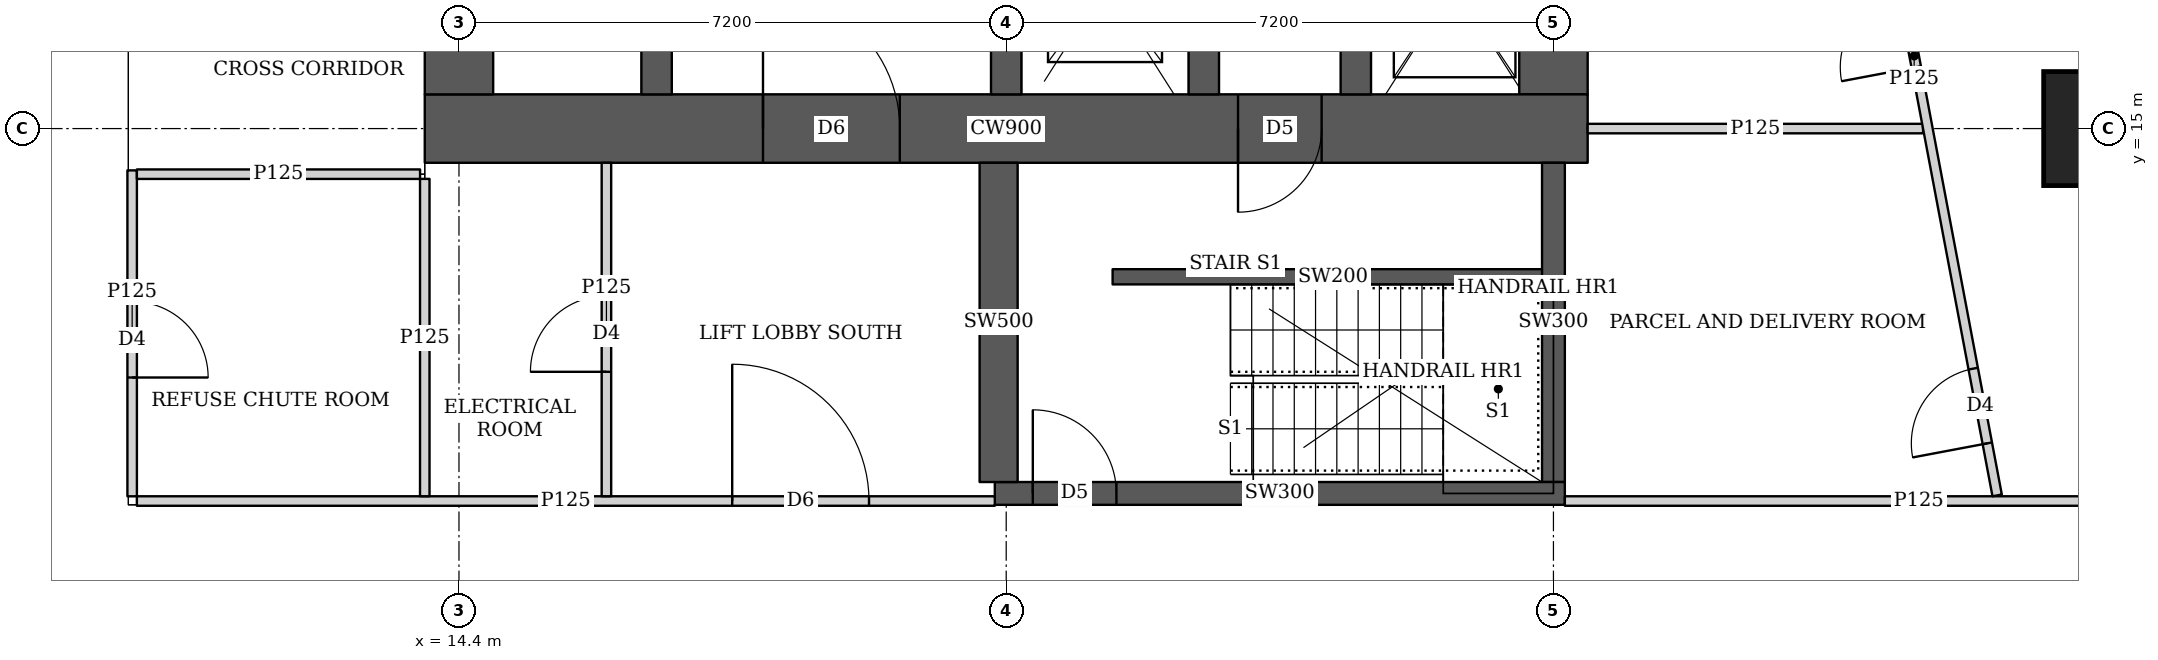
"""IFC4 building model, lengths in metres.
Left out: names, types, materials, properties, quantities, classifications, styles, units other than length and angle.
Written with IfcOpenShell. Run it as: python <this file> out.ifc"""

import sys

from ifc_helpers import new_model, si_unit, direction, frame, frame_2d, origin, origin_2d, place, context, subcontext, project, spatial, rectangle, extrude, element, fill, save


model = new_model("IFC4")
c1 = context("Model", 3, precision=1e-05, world=origin(), true_north=direction((0.0, 1.0)))
c2 = subcontext(c1, "Body", "Model", "MODEL_VIEW")
j1 = project(units=[si_unit("LENGTHUNIT", "METRE"), si_unit("PLANEANGLEUNIT", "RADIAN")], contexts=[c1])
p1 = place(None, origin())
s1 = spatial("IfcSite", under=j1, at=p1, CompositionType="ELEMENT")
p2 = place(p1, origin())
s2 = spatial("IfcBuilding", under=s1, at=p2, CompositionType="ELEMENT")
p3 = place(p2, frame((0.0, 0.0, 169.55)))
s3 = spatial("IfcBuildingStorey", under=s2, at=p3, CompositionType="ELEMENT", Elevation=169.55)
p4 = place(p3, frame((36.0, 15.0, 0.0), z_axis=(0.0, 0.0, 1.0), x_axis=(1.0, 0.0, 0.0)))
e1 = element("IfcColumn", 1, at=p4, inside=s3, PredefinedType="COLUMN", context=c2, shape_type="SweptSolid", body=[
    extrude(rectangle(XDim=1.5, YDim=1.5, at=origin_2d()), origin(), (0.0, 0.0, 1.0), 3.75),
])
p5 = place(p3, frame((13.95, 15.0, 0.0), z_axis=(0.0, 0.0, 1.0), x_axis=(1.0, 0.0, 0.0)))
e2 = element("IfcWall", 2, at=p5, inside=s3, PredefinedType="SHEAR", context=c2, shape_type="SweptSolid", body=[
    extrude(rectangle(XDim=15.3, YDim=0.9, at=frame_2d((7.65, 0.0))), origin(), (0.0, 0.0, 1.0), 3.75),
])
p6 = place(p5, frame((4.45, 0.0, 0.0)))
e3 = element("IfcOpeningElement", 3, at=p6, cuts=e2, PredefinedType="OPENING", context=c2, shape_type="SweptSolid", body=[
    extrude(rectangle(XDim=1.8, YDim=2.1, at=frame_2d((0.9, 1.05))), frame((0.0, 0.46, 0.0), z_axis=(0.0, -1.0, 0.0), x_axis=(1.0, 0.0, 0.0)), (0.0, 0.0, 1.0), 0.92),
])
p7 = place(p5, frame((10.7, 0.0, 0.0)))
e4 = element("IfcOpeningElement", 4, at=p7, cuts=e2, PredefinedType="OPENING", context=c2, shape_type="SweptSolid", body=[
    extrude(rectangle(XDim=1.1, YDim=2.1, at=frame_2d((0.55, 1.05))), frame((0.0, 0.46, 0.0), z_axis=(0.0, -1.0, 0.0), x_axis=(1.0, 0.0, 0.0)), (0.0, 0.0, 1.0), 0.92),
])
for number, where, z_axis, x_axis in (
    (5, (14.4, 15.45, 0.0), (0.0, 0.0, 1.0), (0.0, 1.0, 0.0)),
    (6, (28.8, 15.45, 0.0), (0.0, 0.0, 1.0), (0.0, 1.0, 0.0)),
):
    element("IfcWall", number, at=place(p3, frame(where, z_axis=z_axis, x_axis=x_axis)), inside=s3, PredefinedType="SHEAR", context=c2, shape_type="SweptSolid", body=[
        extrude(rectangle(XDim=14.1, YDim=0.9, at=frame_2d((7.05, 0.0))), origin(), (0.0, 0.0, 1.0), 3.75),
    ])
p8 = place(p3, frame((17.0, 15.45, 0.0), z_axis=(0.0, 0.0, 1.0), x_axis=(0.0, 1.0, 0.0)))
e7 = element("IfcWall", 7, at=p8, inside=s3, PredefinedType="SHEAR", context=c2, shape_type="SweptSolid", body=[
    extrude(rectangle(XDim=14.1, YDim=0.4, at=frame_2d((7.05, 0.0))), origin(), (0.0, 0.0, 1.0), 3.75),
])
p9 = place(p8, frame((0.925, 0.0, 0.0)))
e8 = element("IfcOpeningElement", 8, at=p9, cuts=e7, PredefinedType="OPENING", context=c2, shape_type="SweptSolid", body=[
    extrude(rectangle(XDim=1.0, YDim=2.1, at=frame_2d((0.5, 1.05))), frame((0.0, 0.21, 0.0), z_axis=(0.0, -1.0, 0.0), x_axis=(1.0, 0.0, 0.0)), (0.0, 0.0, 1.0), 0.42),
])
p10 = place(p8, frame((4.675, 0.0, 0.0)))
e9 = element("IfcOpeningElement", 9, at=p10, cuts=e7, PredefinedType="OPENING", context=c2, shape_type="SweptSolid", body=[
    extrude(rectangle(XDim=1.0, YDim=2.1, at=frame_2d((0.5, 1.05))), frame((0.0, 0.21, 0.0), z_axis=(0.0, -1.0, 0.0), x_axis=(1.0, 0.0, 0.0)), (0.0, 0.0, 1.0), 0.42),
])
p11 = place(p8, frame((8.425, 0.0, 0.0)))
e10 = element("IfcOpeningElement", 10, at=p11, cuts=e7, PredefinedType="OPENING", context=c2, shape_type="SweptSolid", body=[
    extrude(rectangle(XDim=1.0, YDim=2.1, at=frame_2d((0.5, 1.05))), frame((0.0, 0.21, 0.0), z_axis=(0.0, -1.0, 0.0), x_axis=(1.0, 0.0, 0.0)), (0.0, 0.0, 1.0), 0.42),
])
p12 = place(p8, frame((12.175, 0.0, 0.0)))
e11 = element("IfcOpeningElement", 11, at=p12, cuts=e7, PredefinedType="OPENING", context=c2, shape_type="SweptSolid", body=[
    extrude(rectangle(XDim=1.0, YDim=2.1, at=frame_2d((0.5, 1.05))), frame((0.0, 0.21, 0.0), z_axis=(0.0, -1.0, 0.0), x_axis=(1.0, 0.0, 0.0)), (0.0, 0.0, 1.0), 0.42),
])
p13 = place(p3, frame((21.6, 15.45, 0.0), z_axis=(0.0, 0.0, 1.0), x_axis=(0.0, 1.0, 0.0)))
e12 = element("IfcWall", 12, at=p13, inside=s3, PredefinedType="SHEAR", context=c2, shape_type="SweptSolid", body=[
    extrude(rectangle(XDim=14.1, YDim=0.4, at=frame_2d((7.05, 0.0))), origin(), (0.0, 0.0, 1.0), 3.75),
])
p14 = place(p13, frame((0.875, 0.0, 0.0)))
e13 = element("IfcOpeningElement", 13, at=p14, cuts=e12, PredefinedType="OPENING", context=c2, shape_type="SweptSolid", body=[
    extrude(rectangle(XDim=1.1, YDim=2.1, at=frame_2d((0.55, 1.05))), frame((0.0, 0.21, 0.0), z_axis=(0.0, -1.0, 0.0), x_axis=(1.0, 0.0, 0.0)), (0.0, 0.0, 1.0), 0.42),
])
p15 = place(p13, frame((4.625, 0.0, 0.0)))
e14 = element("IfcOpeningElement", 14, at=p15, cuts=e12, PredefinedType="OPENING", context=c2, shape_type="SweptSolid", body=[
    extrude(rectangle(XDim=1.1, YDim=2.1, at=frame_2d((0.55, 1.05))), frame((0.0, 0.21, 0.0), z_axis=(0.0, -1.0, 0.0), x_axis=(1.0, 0.0, 0.0)), (0.0, 0.0, 1.0), 0.42),
])
p16 = place(p13, frame((8.375, 0.0, 0.0)))
e15 = element("IfcOpeningElement", 15, at=p16, cuts=e12, PredefinedType="OPENING", context=c2, shape_type="SweptSolid", body=[
    extrude(rectangle(XDim=1.1, YDim=2.1, at=frame_2d((0.55, 1.05))), frame((0.0, 0.21, 0.0), z_axis=(0.0, -1.0, 0.0), x_axis=(1.0, 0.0, 0.0)), (0.0, 0.0, 1.0), 0.42),
])
p17 = place(p13, frame((12.125, 0.0, 0.0)))
e16 = element("IfcOpeningElement", 16, at=p17, cuts=e12, PredefinedType="OPENING", context=c2, shape_type="SweptSolid", body=[
    extrude(rectangle(XDim=1.1, YDim=2.1, at=frame_2d((0.55, 1.05))), frame((0.0, 0.21, 0.0), z_axis=(0.0, -1.0, 0.0), x_axis=(1.0, 0.0, 0.0)), (0.0, 0.0, 1.0), 0.42),
])
p18 = place(p3, frame((24.2, 15.45, 0.0), z_axis=(0.0, 0.0, 1.0), x_axis=(0.0, 1.0, 0.0)))
e17 = element("IfcWall", 17, at=p18, inside=s3, PredefinedType="SHEAR", context=c2, shape_type="SweptSolid", body=[
    extrude(rectangle(XDim=14.1, YDim=0.4, at=frame_2d((7.05, 0.0))), origin(), (0.0, 0.0, 1.0), 3.75),
])
p19 = place(p3, frame((26.2, 15.45, 0.0), z_axis=(0.0, 0.0, 1.0), x_axis=(0.0, 1.0, 0.0)))
e18 = element("IfcWall", 18, at=p19, inside=s3, PredefinedType="SHEAR", context=c2, shape_type="SweptSolid", body=[
    extrude(rectangle(XDim=3.1, YDim=0.4, at=frame_2d((1.55, 0.0))), origin(), (0.0, 0.0, 1.0), 3.75),
])
p20 = place(p19, frame((0.825, 0.0, 0.0)))
e19 = element("IfcOpeningElement", 19, at=p20, cuts=e18, PredefinedType="OPENING", context=c2, shape_type="SweptSolid", body=[
    extrude(rectangle(XDim=1.2, YDim=2.1, at=frame_2d((0.6, 1.05))), frame((0.0, 0.21, 0.0), z_axis=(0.0, -1.0, 0.0), x_axis=(1.0, 0.0, 0.0)), (0.0, 0.0, 1.0), 0.42),
])
p21 = place(p3, frame((21.45, 10.2, 0.0), z_axis=(0.0, 0.0, 1.0), x_axis=(1.0, 0.0, 0.0)))
e20 = element("IfcWall", 20, at=p21, inside=s3, PredefinedType="SHEAR", context=c2, shape_type="SweptSolid", body=[
    extrude(rectangle(XDim=7.5, YDim=0.3, at=frame_2d((3.75, 0.0))), origin(), (0.0, 0.0, 1.0), 3.75),
])
p22 = place(p21, frame((0.5, 0.0, 0.0)))
e21 = element("IfcOpeningElement", 21, at=p22, cuts=e20, PredefinedType="OPENING", context=c2, shape_type="SweptSolid", body=[
    extrude(rectangle(XDim=1.1, YDim=2.1, at=frame_2d((0.55, 1.05))), frame((0.0, 0.16, 0.0), z_axis=(0.0, -1.0, 0.0), x_axis=(1.0, 0.0, 0.0)), (0.0, 0.0, 1.0), 0.32),
])
p23 = place(p3, frame((21.5, 10.35, 0.0), z_axis=(0.0, 0.0, 1.0), x_axis=(0.0, 1.0, 0.0)))
e22 = element("IfcWall", 22, at=p23, inside=s3, PredefinedType="SHEAR", context=c2, shape_type="SweptSolid", body=[
    extrude(rectangle(XDim=4.2, YDim=0.5, at=frame_2d((2.1, 0.0))), origin(), (0.0, 0.0, 1.0), 3.75),
])
p24 = place(p3, frame((28.8, 10.35, 0.0), z_axis=(0.0, 0.0, 1.0), x_axis=(0.0, 1.0, 0.0)))
e23 = element("IfcWall", 23, at=p24, inside=s3, PredefinedType="SHEAR", context=c2, shape_type="SweptSolid", body=[
    extrude(rectangle(XDim=4.2, YDim=0.3, at=frame_2d((2.1, 0.0))), origin(), (0.0, 0.0, 1.0), 3.75),
])
p25 = place(p3, frame((33.877, 43.029, 0.0), z_axis=(0.0, 0.0, 1.0), x_axis=(0.185596841028, -0.98262597798, 0.0)))
e24 = element("IfcWall", 24, at=p25, inside=s3, PredefinedType="SOLIDWALL", context=c2, shape_type="SweptSolid", body=[
    extrude(rectangle(XDim=41.66, YDim=0.15, at=frame_2d((20.83, 0.0))), origin(), (0.0, 0.0, 1.0), 2.5),
])
p26 = place(p25, frame((8.63, 0.0, 0.0)))
e25 = element("IfcOpeningElement", 25, at=p26, cuts=e24, PredefinedType="OPENING", context=c2, shape_type="SweptSolid", body=[
    extrude(rectangle(XDim=1.0, YDim=2.1, at=frame_2d((0.5, 1.05))), frame((0.0, 0.085, 0.0), z_axis=(0.0, -1.0, 0.0), x_axis=(1.0, 0.0, 0.0)), (0.0, 0.0, 1.0), 0.17),
])
p27 = place(p25, frame((13.841, 0.0, 0.0)))
e26 = element("IfcOpeningElement", 26, at=p27, cuts=e24, PredefinedType="OPENING", context=c2, shape_type="SweptSolid", body=[
    extrude(rectangle(XDim=1.0, YDim=2.1, at=frame_2d((0.5, 1.05))), frame((0.0, 0.085, 0.0), z_axis=(0.0, -1.0, 0.0), x_axis=(1.0, 0.0, 0.0)), (0.0, 0.0, 1.0), 0.17),
])
p28 = place(p25, frame((21.474, 0.0, 0.0)))
e27 = element("IfcOpeningElement", 27, at=p28, cuts=e24, PredefinedType="OPENING", context=c2, shape_type="SweptSolid", body=[
    extrude(rectangle(XDim=1.0, YDim=2.1, at=frame_2d((0.5, 1.05))), frame((0.0, 0.085, 0.0), z_axis=(0.0, -1.0, 0.0), x_axis=(1.0, 0.0, 0.0)), (0.0, 0.0, 1.0), 0.17),
])
p29 = place(p25, frame((30.4, 0.0, 0.0)))
e28 = element("IfcOpeningElement", 28, at=p29, cuts=e24, PredefinedType="OPENING", context=c2, shape_type="SweptSolid", body=[
    extrude(rectangle(XDim=1.0, YDim=2.1, at=frame_2d((0.5, 1.05))), frame((0.0, 0.085, 0.0), z_axis=(0.0, -1.0, 0.0), x_axis=(1.0, 0.0, 0.0)), (0.0, 0.0, 1.0), 0.17),
])
p30 = place(p25, frame((32.288, 0.0, 0.0)))
e29 = element("IfcOpeningElement", 29, at=p30, cuts=e24, PredefinedType="OPENING", context=c2, shape_type="SweptSolid", body=[
    extrude(rectangle(XDim=1.0, YDim=2.1, at=frame_2d((0.5, 1.05))), frame((0.0, 0.085, 0.0), z_axis=(0.0, -1.0, 0.0), x_axis=(1.0, 0.0, 0.0)), (0.0, 0.0, 1.0), 0.17),
])
p31 = place(p3, frame((10.1, 10.162, 0.0), z_axis=(0.0, 0.0, 1.0), x_axis=(0.0, 1.0, 0.0)))
e30 = element("IfcWall", 30, at=p31, inside=s3, PredefinedType="PARTITIONING", context=c2, shape_type="SweptSolid", body=[
    extrude(rectangle(XDim=4.288, YDim=0.125, at=frame_2d((2.144, 0.0))), origin(), (0.0, 0.0, 1.0), 3.5),
])
p32 = place(p31, frame((1.563, 0.0, 0.0)))
e31 = element("IfcOpeningElement", 31, at=p32, cuts=e30, PredefinedType="OPENING", context=c2, shape_type="SweptSolid", body=[
    extrude(rectangle(XDim=1.0, YDim=2.1, at=frame_2d((0.5, 1.05))), frame((0.0, 0.073, 0.0), z_axis=(0.0, -1.0, 0.0), x_axis=(1.0, 0.0, 0.0)), (0.0, 0.0, 1.0), 0.145),
])
p33 = place(p3, frame((10.162, 14.4, 0.0), z_axis=(0.0, 0.0, 1.0), x_axis=(1.0, 0.0, 0.0)))
e32 = element("IfcWall", 32, at=p33, inside=s3, PredefinedType="PARTITIONING", context=c2, shape_type="SweptSolid", body=[
    extrude(rectangle(XDim=3.726, YDim=0.125, at=frame_2d((1.863, 0.0))), origin(), (0.0, 0.0, 1.0), 3.5),
])
p34 = place(p3, frame((13.95, 10.163, 0.0), z_axis=(0.0, 0.0, 1.0), x_axis=(0.0, 1.0, 0.0)))
e33 = element("IfcWall", 33, at=p34, inside=s3, PredefinedType="PARTITIONING", context=c2, shape_type="SweptSolid", body=[
    extrude(rectangle(XDim=4.175, YDim=0.125, at=frame_2d((2.087, 0.0))), origin(), (0.0, 0.0, 1.0), 3.5),
])
p35 = place(p3, frame((10.162, 10.1, 0.0), z_axis=(0.0, 0.0, 1.0), x_axis=(1.0, 0.0, 0.0)))
e34 = element("IfcWall", 34, at=p35, inside=s3, PredefinedType="PARTITIONING", context=c2, shape_type="SweptSolid", body=[
    extrude(rectangle(XDim=11.288, YDim=0.125, at=frame_2d((5.644, 0.0))), origin(), (0.0, 0.0, 1.0), 3.5),
])
p36 = place(p35, frame((7.833, 0.0, 0.0)))
e35 = element("IfcOpeningElement", 35, at=p36, cuts=e34, PredefinedType="OPENING", context=c2, shape_type="SweptSolid", body=[
    extrude(rectangle(XDim=1.8, YDim=2.1, at=frame_2d((0.9, 1.05))), frame((0.0, 0.073, 0.0), z_axis=(0.0, -1.0, 0.0), x_axis=(1.0, 0.0, 0.0)), (0.0, 0.0, 1.0), 0.145),
])
p37 = place(p3, frame((16.34, 10.163, 0.0), z_axis=(0.0, 0.0, 1.0), x_axis=(0.0, 1.0, 0.0)))
e36 = element("IfcWall", 36, at=p37, inside=s3, PredefinedType="PARTITIONING", context=c2, shape_type="SweptSolid", body=[
    extrude(rectangle(XDim=4.387, YDim=0.125, at=frame_2d((2.193, 0.0))), origin(), (0.0, 0.0, 1.0), 3.5),
])
p38 = place(p37, frame((1.637, 0.0, 0.0)))
e37 = element("IfcOpeningElement", 37, at=p38, cuts=e36, PredefinedType="OPENING", context=c2, shape_type="SweptSolid", body=[
    extrude(rectangle(XDim=1.0, YDim=2.1, at=frame_2d((0.5, 1.05))), frame((0.0, 0.073, 0.0), z_axis=(0.0, -1.0, 0.0), x_axis=(1.0, 0.0, 0.0)), (0.0, 0.0, 1.0), 0.145),
])
p39 = place(p3, frame((28.95, 10.1, 0.0), z_axis=(0.0, 0.0, 1.0), x_axis=(1.0, 0.0, 0.0)))
e38 = element("IfcWall", 38, at=p39, inside=s3, PredefinedType="PARTITIONING", context=c2, shape_type="SweptSolid", body=[
    extrude(rectangle(XDim=9.315, YDim=0.125, at=frame_2d((4.657, 0.0))), origin(), (0.0, 0.0, 1.0), 3.5),
])
p40 = place(p3, frame((34.638, 10.174, 0.0), z_axis=(0.0, 0.0, 1.0), x_axis=(-0.185583626094, 0.982628473903, 0.0)))
e39 = element("IfcWall", 39, at=p40, inside=s3, PredefinedType="PARTITIONING", context=c2, shape_type="SweptSolid", body=[
    extrude(rectangle(XDim=11.767, YDim=0.125, at=frame_2d((5.884, 0.0))), origin(), (0.0, 0.0, 1.0), 3.5),
])
p41 = place(p40, frame((0.697, 0.0, 0.0)))
e40 = element("IfcOpeningElement", 40, at=p41, cuts=e39, PredefinedType="OPENING", context=c2, shape_type="SweptSolid", body=[
    extrude(rectangle(XDim=1.0, YDim=2.1, at=frame_2d((0.5, 1.05))), frame((0.0, 0.073, 0.0), z_axis=(0.0, -1.0, 0.0), x_axis=(1.0, 0.0, 0.0)), (0.0, 0.0, 1.0), 0.145),
])
p42 = place(p40, frame((5.734, 0.0, 0.0)))
e41 = element("IfcOpeningElement", 41, at=p42, cuts=e39, PredefinedType="OPENING", context=c2, shape_type="SweptSolid", body=[
    extrude(rectangle(XDim=1.0, YDim=2.1, at=frame_2d((0.5, 1.05))), frame((0.0, 0.073, 0.0), z_axis=(0.0, -1.0, 0.0), x_axis=(1.0, 0.0, 0.0)), (0.0, 0.0, 1.0), 0.145),
])
p43 = place(p3, frame((29.25, 15.0, 0.0), z_axis=(0.0, 0.0, 1.0), x_axis=(1.0, 0.0, 0.0)))
e42 = element("IfcWall", 42, at=p43, inside=s3, PredefinedType="PARTITIONING", context=c2, shape_type="SweptSolid", body=[
    extrude(rectangle(XDim=4.413, YDim=0.125, at=frame_2d((2.207, 0.0))), origin(), (0.0, 0.0, 1.0), 3.5),
])
p44 = place(p3, frame((23.0, 13.05, 0.0), z_axis=(0.0, 0.0, 1.0), x_axis=(1.0, 0.0, 0.0)))
e43 = element("IfcWall", 43, at=p44, inside=s3, PredefinedType="SHEAR", context=c2, shape_type="SweptSolid", body=[
    extrude(rectangle(XDim=5.8, YDim=0.2, at=frame_2d((2.9, 0.0))), origin(), (0.0, 0.0, 1.0), 3.75),
])
p45 = place(p32, origin())
e44 = element("IfcDoor", 44, at=p45, inside=s3, OperationType="SINGLE_SWING_RIGHT", PredefinedType="DOOR", context=c2, shape_type="SweptSolid", body=[
    extrude(rectangle(XDim=1.0, YDim=2.1, at=frame_2d((0.5, 1.05))), frame((0.0, 0.025, 0.0), z_axis=(0.0, -1.0, 0.0), x_axis=(1.0, 0.0, 0.0)), (0.0, 0.0, 1.0), 0.05),
])
fill(e31, e44)
p46 = place(p38, origin())
e45 = element("IfcDoor", 45, at=p46, inside=s3, OperationType="SINGLE_SWING_LEFT", PredefinedType="DOOR", context=c2, shape_type="SweptSolid", body=[
    extrude(rectangle(XDim=1.0, YDim=2.1, at=frame_2d((0.5, 1.05))), frame((0.0, 0.025, 0.0), z_axis=(0.0, -1.0, 0.0), x_axis=(1.0, 0.0, 0.0)), (0.0, 0.0, 1.0), 0.05),
])
fill(e37, e45)
p47 = place(p36, origin())
e46 = element("IfcDoor", 46, at=p47, inside=s3, OperationType="DOUBLE_DOOR_SINGLE_SWING", PredefinedType="DOOR", context=c2, shape_type="SweptSolid", body=[
    extrude(rectangle(XDim=1.8, YDim=2.1, at=frame_2d((0.9, 1.05))), frame((0.0, 0.025, 0.0), z_axis=(0.0, -1.0, 0.0), x_axis=(1.0, 0.0, 0.0)), (0.0, 0.0, 1.0), 0.05),
])
fill(e35, e46)
p48 = place(p41, origin())
e47 = element("IfcDoor", 47, at=p48, inside=s3, OperationType="SINGLE_SWING_LEFT", PredefinedType="DOOR", context=c2, shape_type="SweptSolid", body=[
    extrude(rectangle(XDim=1.0, YDim=2.1, at=frame_2d((0.5, 1.05))), frame((0.0, 0.025, 0.0), z_axis=(0.0, -1.0, 0.0), x_axis=(1.0, 0.0, 0.0)), (0.0, 0.0, 1.0), 0.05),
])
fill(e40, e47)
p49 = place(p42, origin())
e48 = element("IfcDoor", 48, at=p49, inside=s3, OperationType="SINGLE_SWING_LEFT", PredefinedType="DOOR", context=c2, shape_type="SweptSolid", body=[
    extrude(rectangle(XDim=1.0, YDim=2.1, at=frame_2d((0.5, 1.05))), frame((0.0, 0.025, 0.0), z_axis=(0.0, -1.0, 0.0), x_axis=(1.0, 0.0, 0.0)), (0.0, 0.0, 1.0), 0.05),
])
fill(e41, e48)
p50 = place(p6, origin())
e49 = element("IfcDoor", 49, at=p50, inside=s3, OperationType="DOUBLE_DOOR_SINGLE_SWING", PredefinedType="DOOR", context=c2, shape_type="SweptSolid", body=[
    extrude(rectangle(XDim=1.8, YDim=2.1, at=frame_2d((0.9, 1.05))), frame((0.0, 0.025, 0.0), z_axis=(0.0, -1.0, 0.0), x_axis=(1.0, 0.0, 0.0)), (0.0, 0.0, 1.0), 0.05),
])
fill(e3, e49)
p51 = place(p7, origin())
e50 = element("IfcDoor", 50, at=p51, inside=s3, OperationType="SINGLE_SWING_RIGHT", PredefinedType="DOOR", context=c2, shape_type="SweptSolid", body=[
    extrude(rectangle(XDim=1.1, YDim=2.1, at=frame_2d((0.55, 1.05))), frame((0.0, 0.025, 0.0), z_axis=(0.0, -1.0, 0.0), x_axis=(1.0, 0.0, 0.0)), (0.0, 0.0, 1.0), 0.05),
])
fill(e4, e50)
p52 = place(p22, origin())
e51 = element("IfcDoor", 51, at=p52, inside=s3, OperationType="SINGLE_SWING_LEFT", PredefinedType="DOOR", context=c2, shape_type="SweptSolid", body=[
    extrude(rectangle(XDim=1.1, YDim=2.1, at=frame_2d((0.55, 1.05))), frame((0.0, 0.025, 0.0), z_axis=(0.0, -1.0, 0.0), x_axis=(1.0, 0.0, 0.0)), (0.0, 0.0, 1.0), 0.05),
])
fill(e21, e51)
save(model, sys.argv[1])
